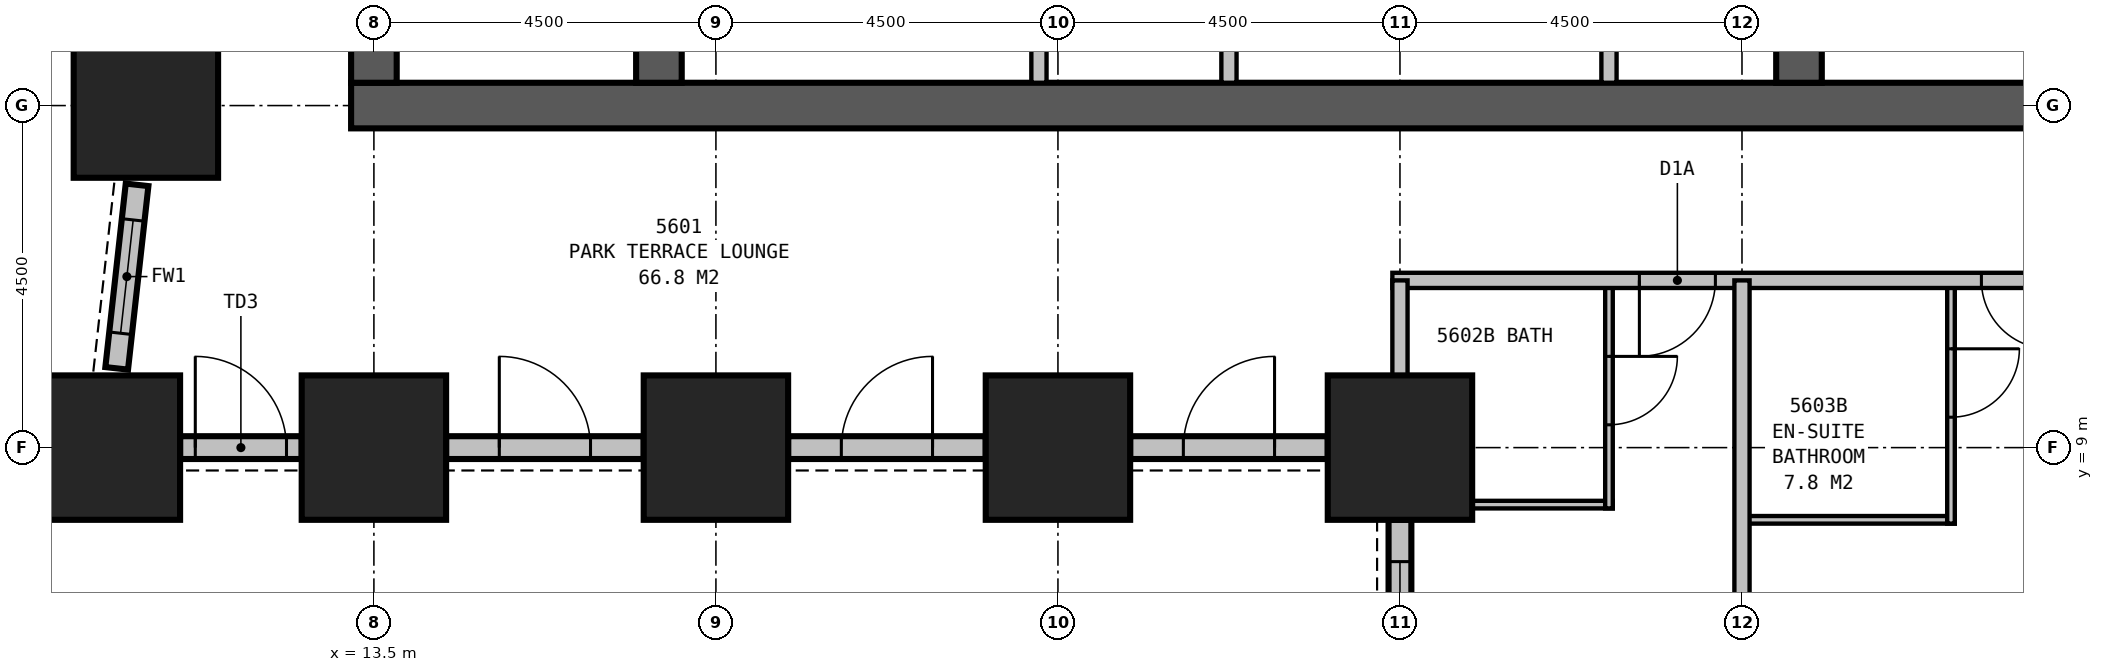
"""IFC4 building model, lengths in metres.
Left out: names, types, materials, properties, quantities, classifications, styles, units other than length and angle.
Written with IfcOpenShell. Run it as: python <this file> out.ifc"""

import sys

from ifc_helpers import new_model, si_unit, direction, frame, frame_2d, origin, origin_2d, place, context, subcontext, project, spatial, rectangle, extrude, element, fill, save


model = new_model("IFC4")
c1 = context("Model", 3, precision=1e-05, world=origin(), true_north=direction((0.0, 1.0)))
c2 = subcontext(c1, "Body", "Model", "MODEL_VIEW")
j1 = project(units=[si_unit("LENGTHUNIT", "METRE"), si_unit("PLANEANGLEUNIT", "RADIAN")], contexts=[c1])
p1 = place(None, origin())
s1 = spatial("IfcSite", under=j1, at=p1, CompositionType="ELEMENT")
p2 = place(p1, origin())
s2 = spatial("IfcBuilding", under=s1, at=p2, CompositionType="ELEMENT")
p3 = place(p2, frame((0.0, 0.0, 217.4)))
s3 = spatial("IfcBuildingStorey", under=s2, at=p3, CompositionType="ELEMENT", Elevation=217.4)
for number, where, z_axis, x_axis in (
    (1, (10.0, 9.0, 0.0), (0.0, 0.0, 1.0), (1.0, 0.0, 0.0)),
    (2, (13.5, 9.0, 0.0), (0.0, 0.0, 1.0), (1.0, 0.0, 0.0)),
    (3, (18.0, 9.0, 0.0), (0.0, 0.0, 1.0), (1.0, 0.0, 0.0)),
    (4, (22.5, 9.0, 0.0), (0.0, 0.0, 1.0), (1.0, 0.0, 0.0)),
    (5, (27.0, 9.0, 0.0), (0.0, 0.0, 1.0), (1.0, 0.0, 0.0)),
    (6, (10.5, 13.5, 0.0), (0.0, 0.0, 1.0), (1.0, 0.0, 0.0)),
):
    element("IfcColumn", number, at=place(p3, frame(where, z_axis=z_axis, x_axis=x_axis)), inside=s3, PredefinedType="COLUMN", context=c2, shape_type="SweptSolid", body=[
        extrude(rectangle(XDim=1.9, YDim=1.9, at=origin_2d()), origin(), (0.0, 0.0, 1.0), 3.9),
    ])
p4 = place(p3, frame((13.2, 13.5, 0.0), z_axis=(0.0, 0.0, 1.0), x_axis=(1.0, 0.0, 0.0)))
e7 = element("IfcWall", 7, at=p4, inside=s3, PredefinedType="SHEAR", context=c2, shape_type="SweptSolid", body=[
    extrude(rectangle(XDim=23.1, YDim=0.6, at=frame_2d((11.55, 0.0))), origin(), (0.0, 0.0, 1.0), 3.9),
])
p5 = place(p3, frame((17.25, 13.8, 0.0), z_axis=(0.0, 0.0, 1.0), x_axis=(0.0, 1.0, 0.0)))
e8 = element("IfcWall", 8, at=p5, inside=s3, PredefinedType="SHEAR", context=c2, shape_type="SweptSolid", body=[
    extrude(rectangle(XDim=12.9, YDim=0.6, at=frame_2d((6.45, 0.0))), origin(), (0.0, 0.0, 1.0), 3.9),
])
p6 = place(p5, frame((3.85, 0.0, 0.0)))
e9 = element("IfcOpeningElement", 9, at=p6, cuts=e8, PredefinedType="OPENING", context=c2, shape_type="SweptSolid", body=[
    extrude(rectangle(XDim=1.2, YDim=2.1, at=frame_2d((0.6, 1.05))), frame((0.0, 0.31, 0.0), z_axis=(0.0, -1.0, 0.0), x_axis=(1.0, 0.0, 0.0)), (0.0, 0.0, 1.0), 0.62),
])
p7 = place(p3, frame((32.25, 13.8, 0.0), z_axis=(0.0, 0.0, 1.0), x_axis=(0.0, 1.0, 0.0)))
e10 = element("IfcWall", 10, at=p7, inside=s3, PredefinedType="SHEAR", context=c2, shape_type="SweptSolid", body=[
    extrude(rectangle(XDim=12.9, YDim=0.6, at=frame_2d((6.45, 0.0))), origin(), (0.0, 0.0, 1.0), 3.9),
])
p8 = place(p7, frame((5.05, 0.0, 0.0), z_axis=(0.0, 0.0, 1.0), x_axis=(-1.0, 0.0, 0.0)))
e11 = element("IfcOpeningElement", 11, at=p8, cuts=e10, PredefinedType="OPENING", context=c2, shape_type="SweptSolid", body=[
    extrude(rectangle(XDim=1.2, YDim=2.1, at=frame_2d((0.6, 1.05))), frame((0.0, 0.31, 0.0), z_axis=(0.0, -1.0, 0.0), x_axis=(1.0, 0.0, 0.0)), (0.0, 0.0, 1.0), 0.62),
])
p9 = place(p3, frame((13.5, 16.5, 0.0), z_axis=(0.0, 0.0, 1.0), x_axis=(0.0, -1.0, 0.0)))
e12 = element("IfcWall", 12, at=p9, inside=s3, PredefinedType="SHEAR", context=c2, shape_type="SweptSolid", body=[
    extrude(rectangle(XDim=2.7, YDim=0.6, at=frame_2d((1.35, 0.0))), origin(), (0.0, 0.0, 1.0), 3.9),
])
p10 = place(p3, frame((10.95, 9.0, 0.0), z_axis=(0.0, 0.0, 1.0), x_axis=(1.0, 0.0, 0.0)))
e13 = element("IfcWall", 13, at=p10, inside=s3, PredefinedType="STANDARD", context=c2, shape_type="SweptSolid", body=[
    extrude(rectangle(XDim=1.6, YDim=0.3, at=frame_2d((0.8, 0.0))), origin(), (0.0, 0.0, 1.0), 2.15),
])
p11 = place(p10, frame((0.2, 0.0, 0.0)))
e14 = element("IfcOpeningElement", 14, at=p11, cuts=e13, PredefinedType="OPENING", context=c2, shape_type="SweptSolid", body=[
    extrude(rectangle(XDim=1.2, YDim=2.0, at=frame_2d((0.6, 1.0))), frame((0.0, 0.16, 0.0), z_axis=(0.0, -1.0, 0.0), x_axis=(1.0, 0.0, 0.0)), (0.0, 0.0, 1.0), 0.32),
])
p12 = place(p3, frame((14.45, 9.0, 0.0), z_axis=(0.0, 0.0, 1.0), x_axis=(1.0, 0.0, 0.0)))
e15 = element("IfcWall", 15, at=p12, inside=s3, PredefinedType="STANDARD", context=c2, shape_type="SweptSolid", body=[
    extrude(rectangle(XDim=2.6, YDim=0.3, at=frame_2d((1.3, 0.0))), origin(), (0.0, 0.0, 1.0), 2.15),
])
p13 = place(p12, frame((0.7, 0.0, 0.0)))
e16 = element("IfcOpeningElement", 16, at=p13, cuts=e15, PredefinedType="OPENING", context=c2, shape_type="SweptSolid", body=[
    extrude(rectangle(XDim=1.2, YDim=2.0, at=frame_2d((0.6, 1.0))), frame((0.0, 0.16, 0.0), z_axis=(0.0, -1.0, 0.0), x_axis=(1.0, 0.0, 0.0)), (0.0, 0.0, 1.0), 0.32),
])
p14 = place(p3, frame((18.95, 9.0, 0.0), z_axis=(0.0, 0.0, 1.0), x_axis=(1.0, 0.0, 0.0)))
e17 = element("IfcWall", 17, at=p14, inside=s3, PredefinedType="STANDARD", context=c2, shape_type="SweptSolid", body=[
    extrude(rectangle(XDim=2.6, YDim=0.3, at=frame_2d((1.3, 0.0))), origin(), (0.0, 0.0, 1.0), 2.15),
])
p15 = place(p14, frame((0.7, 0.0, 0.0)))
e18 = element("IfcOpeningElement", 18, at=p15, cuts=e17, PredefinedType="OPENING", context=c2, shape_type="SweptSolid", body=[
    extrude(rectangle(XDim=1.2, YDim=2.0, at=frame_2d((0.6, 1.0))), frame((0.0, 0.16, 0.0), z_axis=(0.0, -1.0, 0.0), x_axis=(1.0, 0.0, 0.0)), (0.0, 0.0, 1.0), 0.32),
])
p16 = place(p3, frame((23.45, 9.0, 0.0), z_axis=(0.0, 0.0, 1.0), x_axis=(1.0, 0.0, 0.0)))
e19 = element("IfcWall", 19, at=p16, inside=s3, PredefinedType="STANDARD", context=c2, shape_type="SweptSolid", body=[
    extrude(rectangle(XDim=2.6, YDim=0.3, at=frame_2d((1.3, 0.0))), origin(), (0.0, 0.0, 1.0), 2.15),
])
p17 = place(p16, frame((0.7, 0.0, 0.0)))
e20 = element("IfcOpeningElement", 20, at=p17, cuts=e19, PredefinedType="OPENING", context=c2, shape_type="SweptSolid", body=[
    extrude(rectangle(XDim=1.2, YDim=2.0, at=frame_2d((0.6, 1.0))), frame((0.0, 0.16, 0.0), z_axis=(0.0, -1.0, 0.0), x_axis=(1.0, 0.0, 0.0)), (0.0, 0.0, 1.0), 0.32),
])
p18 = place(p3, frame((27.0, 8.05, 0.0), z_axis=(0.0, 0.0, 1.0), x_axis=(0.0, -1.0, 0.0)))
e21 = element("IfcWall", 21, at=p18, inside=s3, PredefinedType="STANDARD", context=c2, shape_type="SweptSolid", body=[
    extrude(rectangle(XDim=2.6, YDim=0.3, at=frame_2d((1.3, 0.0))), origin(), (0.0, 0.0, 1.0), 2.15),
])
p19 = place(p18, frame((0.55, 0.0, 0.5)))
e22 = element("IfcOpeningElement", 22, at=p19, cuts=e21, PredefinedType="OPENING", context=c2, shape_type="SweptSolid", body=[
    extrude(rectangle(XDim=1.5, YDim=1.5, at=frame_2d((0.75, 0.75))), frame((0.0, 0.16, 0.0), z_axis=(0.0, -1.0, 0.0), x_axis=(1.0, 0.0, 0.0)), (0.0, 0.0, 1.0), 0.32),
])
p20 = place(p3, frame((10.384, 12.457, 0.0), z_axis=(0.0, 0.0, 1.0), x_axis=(-0.110343286306, -0.993893535127, 0.0)))
e23 = element("IfcWall", 23, at=p20, inside=s3, PredefinedType="STANDARD", context=c2, shape_type="SweptSolid", body=[
    extrude(rectangle(XDim=2.429, YDim=0.3, at=frame_2d((1.215, 0.0))), origin(), (0.0, 0.0, 1.0), 2.15),
])
p21 = place(p20, frame((0.465, 0.0, 0.5)))
e24 = element("IfcOpeningElement", 24, at=p21, cuts=e23, PredefinedType="OPENING", context=c2, shape_type="SweptSolid", body=[
    extrude(rectangle(XDim=1.5, YDim=1.5, at=frame_2d((0.75, 0.75))), frame((0.0, 0.16, 0.0), z_axis=(0.0, -1.0, 0.0), x_axis=(1.0, 0.0, 0.0)), (0.0, 0.0, 1.0), 0.32),
])
p22 = place(p3, frame((26.9, 11.2, 0.0), z_axis=(0.0, 0.0, 1.0), x_axis=(1.0, 0.0, 0.0)))
e25 = element("IfcWall", 25, at=p22, inside=s3, PredefinedType="PARTITIONING", context=c2, shape_type="SweptSolid", body=[
    extrude(rectangle(XDim=11.4, YDim=0.2, at=frame_2d((5.7, 0.0))), origin(), (0.0, 0.0, 1.0), 3.65),
])
p23 = place(p22, frame((4.25, 0.0, 0.0), z_axis=(0.0, 0.0, 1.0), x_axis=(-1.0, 0.0, 0.0)))
e26 = element("IfcOpeningElement", 26, at=p23, cuts=e25, PredefinedType="OPENING", context=c2, shape_type="SweptSolid", body=[
    extrude(rectangle(XDim=1.0, YDim=2.1, at=frame_2d((0.5, 1.05))), frame((0.0, 0.11, 0.0), z_axis=(0.0, -1.0, 0.0), x_axis=(1.0, 0.0, 0.0)), (0.0, 0.0, 1.0), 0.22),
])
p24 = place(p22, frame((8.65, 0.0, 0.0), z_axis=(0.0, 0.0, 1.0), x_axis=(-1.0, 0.0, 0.0)))
e27 = element("IfcOpeningElement", 27, at=p24, cuts=e25, PredefinedType="OPENING", context=c2, shape_type="SweptSolid", body=[
    extrude(rectangle(XDim=0.9, YDim=2.1, at=frame_2d((0.45, 1.05))), frame((0.0, 0.11, 0.0), z_axis=(0.0, -1.0, 0.0), x_axis=(1.0, 0.0, 0.0)), (0.0, 0.0, 1.0), 0.22),
])
p25 = place(p22, frame((10.7, 0.0, 0.0), z_axis=(0.0, 0.0, 1.0), x_axis=(-1.0, 0.0, 0.0)))
e28 = element("IfcOpeningElement", 28, at=p25, cuts=e25, PredefinedType="OPENING", context=c2, shape_type="SweptSolid", body=[
    extrude(rectangle(XDim=0.9, YDim=2.1, at=frame_2d((0.45, 1.05))), frame((0.0, 0.11, 0.0), z_axis=(0.0, -1.0, 0.0), x_axis=(1.0, 0.0, 0.0)), (0.0, 0.0, 1.0), 0.22),
])
p26 = place(p3, frame((27.0, 11.2, 0.0), z_axis=(0.0, 0.0, 1.0), x_axis=(0.0, -1.0, 0.0)))
e29 = element("IfcWall", 29, at=p26, inside=s3, PredefinedType="PARTITIONING", context=c2, shape_type="SweptSolid", body=[
    extrude(rectangle(XDim=2.2, YDim=0.2, at=frame_2d((1.1, 0.0))), origin(), (0.0, 0.0, 1.0), 2.65),
])
p27 = place(p3, frame((31.5, 11.2, 0.0), z_axis=(0.0, 0.0, 1.0), x_axis=(0.0, -1.0, 0.0)))
e30 = element("IfcWall", 30, at=p27, inside=s3, PredefinedType="PARTITIONING", context=c2, shape_type="SweptSolid", body=[
    extrude(rectangle(XDim=11.2, YDim=0.2, at=frame_2d((5.6, 0.0))), origin(), (0.0, 0.0, 1.0), 2.65),
])
p28 = place(p3, frame((27.0, 8.25, 0.0), z_axis=(0.0, 0.0, 1.0), x_axis=(1.0, 0.0, 0.0)))
e31 = element("IfcWall", 31, at=p28, inside=s3, PredefinedType="PLUMBINGWALL", context=c2, shape_type="SweptSolid", body=[
    extrude(rectangle(XDim=2.8, YDim=0.1, at=frame_2d((1.4, 0.0))), origin(), (0.0, 0.0, 1.0), 3.65),
])
p29 = place(p3, frame((29.75, 11.2, 0.0), z_axis=(0.0, 0.0, 1.0), x_axis=(0.0, -1.0, 0.0)))
e32 = element("IfcWall", 32, at=p29, inside=s3, PredefinedType="PLUMBINGWALL", context=c2, shape_type="SweptSolid", body=[
    extrude(rectangle(XDim=3.0, YDim=0.1, at=frame_2d((1.5, 0.0))), origin(), (0.0, 0.0, 1.0), 3.65),
])
p30 = place(p29, frame((1.0, 0.0, 0.0)))
e33 = element("IfcOpeningElement", 33, at=p30, cuts=e32, PredefinedType="OPENING", context=c2, shape_type="SweptSolid", body=[
    extrude(rectangle(XDim=0.9, YDim=2.1, at=frame_2d((0.45, 1.05))), frame((0.0, 0.06, 0.0), z_axis=(0.0, -1.0, 0.0), x_axis=(1.0, 0.0, 0.0)), (0.0, 0.0, 1.0), 0.12),
])
p31 = place(p3, frame((31.5, 8.05, 0.0), z_axis=(0.0, 0.0, 1.0), x_axis=(1.0, 0.0, 0.0)))
e34 = element("IfcWall", 34, at=p31, inside=s3, PredefinedType="PLUMBINGWALL", context=c2, shape_type="SweptSolid", body=[
    extrude(rectangle(XDim=2.8, YDim=0.1, at=frame_2d((1.4, 0.0))), origin(), (0.0, 0.0, 1.0), 3.65),
])
p32 = place(p3, frame((34.25, 11.2, 0.0), z_axis=(0.0, 0.0, 1.0), x_axis=(0.0, -1.0, 0.0)))
e35 = element("IfcWall", 35, at=p32, inside=s3, PredefinedType="PLUMBINGWALL", context=c2, shape_type="SweptSolid", body=[
    extrude(rectangle(XDim=3.2, YDim=0.1, at=frame_2d((1.6, 0.0))), origin(), (0.0, 0.0, 1.0), 3.65),
])
p33 = place(p32, frame((0.9, 0.0, 0.0)))
e36 = element("IfcOpeningElement", 36, at=p33, cuts=e35, PredefinedType="OPENING", context=c2, shape_type="SweptSolid", body=[
    extrude(rectangle(XDim=0.9, YDim=2.1, at=frame_2d((0.45, 1.05))), frame((0.0, 0.06, 0.0), z_axis=(0.0, -1.0, 0.0), x_axis=(1.0, 0.0, 0.0)), (0.0, 0.0, 1.0), 0.12),
])
for number, where, z_axis, x_axis in (
    (37, (22.25, 13.8, 0.0), (0.0, 0.0, 1.0), (0.0, 1.0, 0.0)),
    (38, (24.75, 13.8, 0.0), (0.0, 0.0, 1.0), (0.0, 1.0, 0.0)),
    (39, (29.75, 13.8, 0.0), (0.0, 0.0, 1.0), (0.0, 1.0, 0.0)),
):
    element("IfcWall", number, at=place(p3, frame(where, z_axis=z_axis, x_axis=x_axis)), inside=s3, PredefinedType="PARTITIONING", context=c2, shape_type="SweptSolid", body=[
        extrude(rectangle(XDim=2.4, YDim=0.2, at=frame_2d((1.2, 0.0))), origin(), (0.0, 0.0, 1.0), 3.65),
    ])
p34 = place(p11, origin())
e40 = element("IfcDoor", 40, at=p34, inside=s3, OperationType="SINGLE_SWING_LEFT", PredefinedType="DOOR", context=c2, shape_type="SweptSolid", body=[
    extrude(rectangle(XDim=1.2, YDim=2.0, at=frame_2d((0.6, 1.0))), frame((0.0, 0.025, 0.0), z_axis=(0.0, -1.0, 0.0), x_axis=(1.0, 0.0, 0.0)), (0.0, 0.0, 1.0), 0.05),
])
fill(e14, e40)
p35 = place(p13, origin())
e41 = element("IfcDoor", 41, at=p35, inside=s3, OperationType="SINGLE_SWING_LEFT", PredefinedType="DOOR", context=c2, shape_type="SweptSolid", body=[
    extrude(rectangle(XDim=1.2, YDim=2.0, at=frame_2d((0.6, 1.0))), frame((0.0, 0.025, 0.0), z_axis=(0.0, -1.0, 0.0), x_axis=(1.0, 0.0, 0.0)), (0.0, 0.0, 1.0), 0.05),
])
fill(e16, e41)
p36 = place(p15, origin())
e42 = element("IfcDoor", 42, at=p36, inside=s3, OperationType="SINGLE_SWING_RIGHT", PredefinedType="DOOR", context=c2, shape_type="SweptSolid", body=[
    extrude(rectangle(XDim=1.2, YDim=2.0, at=frame_2d((0.6, 1.0))), frame((0.0, 0.025, 0.0), z_axis=(0.0, -1.0, 0.0), x_axis=(1.0, 0.0, 0.0)), (0.0, 0.0, 1.0), 0.05),
])
fill(e18, e42)
p37 = place(p17, origin())
e43 = element("IfcDoor", 43, at=p37, inside=s3, OperationType="SINGLE_SWING_RIGHT", PredefinedType="DOOR", context=c2, shape_type="SweptSolid", body=[
    extrude(rectangle(XDim=1.2, YDim=2.0, at=frame_2d((0.6, 1.0))), frame((0.0, 0.025, 0.0), z_axis=(0.0, -1.0, 0.0), x_axis=(1.0, 0.0, 0.0)), (0.0, 0.0, 1.0), 0.05),
])
fill(e20, e43)
p38 = place(p19, origin())
e44 = element("IfcWindow", 44, at=p38, inside=s3, PartitioningType="SINGLE_PANEL", PredefinedType="WINDOW", context=c2, shape_type="SweptSolid", body=[
    extrude(rectangle(XDim=1.5, YDim=1.5, at=frame_2d((0.75, 0.75))), frame((0.0, 0.03, 0.0), z_axis=(0.0, -1.0, 0.0), x_axis=(1.0, 0.0, 0.0)), (0.0, 0.0, 1.0), 0.06),
])
fill(e22, e44)
p39 = place(p21, origin())
e45 = element("IfcWindow", 45, at=p39, inside=s3, PartitioningType="SINGLE_PANEL", PredefinedType="WINDOW", context=c2, shape_type="SweptSolid", body=[
    extrude(rectangle(XDim=1.5, YDim=1.5, at=frame_2d((0.75, 0.75))), frame((0.0, 0.03, 0.0), z_axis=(0.0, -1.0, 0.0), x_axis=(1.0, 0.0, 0.0)), (0.0, 0.0, 1.0), 0.06),
])
fill(e24, e45)
p40 = place(p23, origin())
e46 = element("IfcDoor", 46, at=p40, inside=s3, OperationType="SINGLE_SWING_RIGHT", PredefinedType="DOOR", context=c2, shape_type="SweptSolid", body=[
    extrude(rectangle(XDim=1.0, YDim=2.1, at=frame_2d((0.5, 1.05))), frame((0.0, 0.025, 0.0), z_axis=(0.0, -1.0, 0.0), x_axis=(1.0, 0.0, 0.0)), (0.0, 0.0, 1.0), 0.05),
])
fill(e26, e46)
p41 = place(p24, origin())
e47 = element("IfcDoor", 47, at=p41, inside=s3, OperationType="SINGLE_SWING_LEFT", PredefinedType="DOOR", context=c2, shape_type="SweptSolid", body=[
    extrude(rectangle(XDim=0.9, YDim=2.1, at=frame_2d((0.45, 1.05))), frame((0.0, 0.025, 0.0), z_axis=(0.0, -1.0, 0.0), x_axis=(1.0, 0.0, 0.0)), (0.0, 0.0, 1.0), 0.05),
])
fill(e27, e47)
p42 = place(p30, origin())
e48 = element("IfcDoor", 48, at=p42, inside=s3, OperationType="SINGLE_SWING_LEFT", PredefinedType="DOOR", context=c2, shape_type="SweptSolid", body=[
    extrude(rectangle(XDim=0.9, YDim=2.1, at=frame_2d((0.45, 1.05))), frame((0.0, 0.025, 0.0), z_axis=(0.0, -1.0, 0.0), x_axis=(1.0, 0.0, 0.0)), (0.0, 0.0, 1.0), 0.05),
])
fill(e33, e48)
p43 = place(p33, origin())
e49 = element("IfcDoor", 49, at=p43, inside=s3, OperationType="SINGLE_SWING_LEFT", PredefinedType="DOOR", context=c2, shape_type="SweptSolid", body=[
    extrude(rectangle(XDim=0.9, YDim=2.1, at=frame_2d((0.45, 1.05))), frame((0.0, 0.025, 0.0), z_axis=(0.0, -1.0, 0.0), x_axis=(1.0, 0.0, 0.0)), (0.0, 0.0, 1.0), 0.05),
])
fill(e36, e49)
save(model, sys.argv[1])
